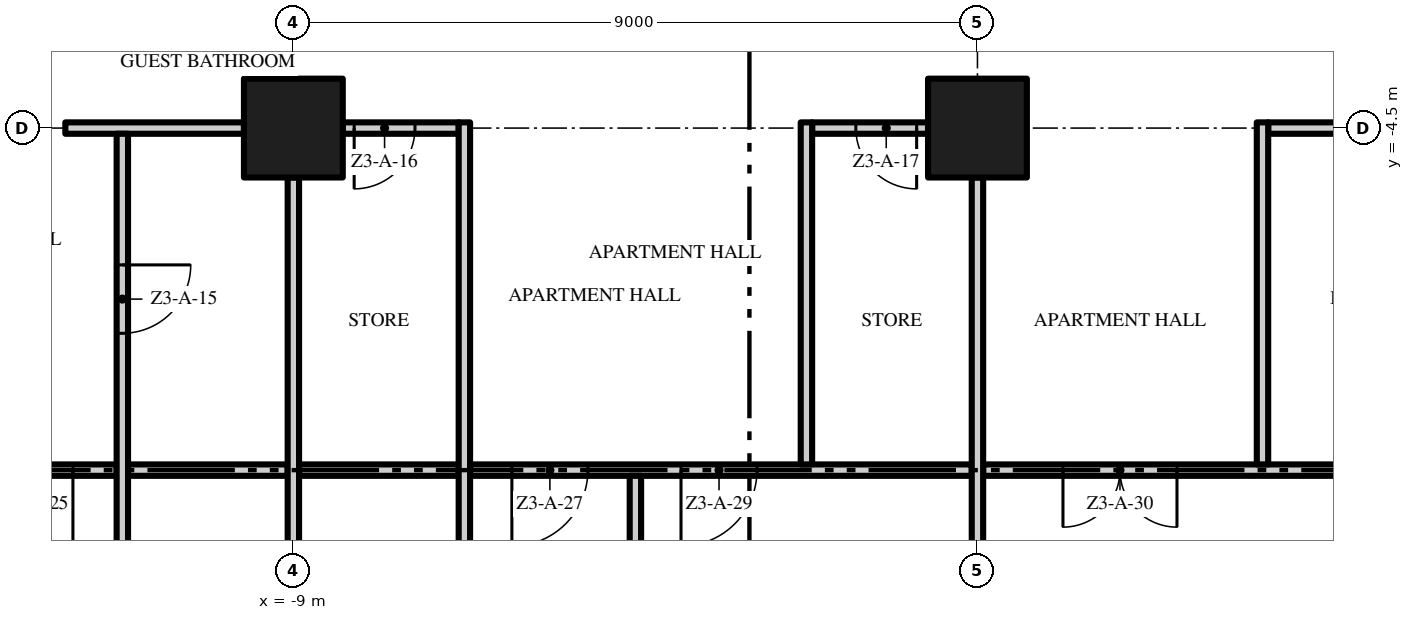
"""IFC4 building model, lengths in metres.
Left out: names, types, materials, properties, quantities, classifications, styles, units other than length and angle.
Written with IfcOpenShell. Run it as: python <this file> out.ifc"""

import sys

from ifc_helpers import new_model, si_unit, direction, frame, frame_2d, origin, origin_2d, place, context, subcontext, project, spatial, rectangle, extrude, element, fill, save


model = new_model("IFC4")
c1 = context("Model", 3, precision=1e-05, world=origin(), true_north=direction((0.0, 1.0)))
c2 = subcontext(c1, "Body", "Model", "MODEL_VIEW")
j1 = project(units=[si_unit("LENGTHUNIT", "METRE"), si_unit("PLANEANGLEUNIT", "RADIAN")], contexts=[c1])
p1 = place(None, origin())
s1 = spatial("IfcSite", under=j1, at=p1, CompositionType="ELEMENT")
p2 = place(p1, origin())
s2 = spatial("IfcBuilding", under=s1, at=p2, CompositionType="ELEMENT")
p3 = place(p2, frame((0.0, 0.0, 125.0)))
s3 = spatial("IfcBuildingStorey", under=s2, at=p3, CompositionType="ELEMENT", Elevation=125.0)
for number, where, z_axis, x_axis in (
    (1, (-9.0, -4.5, 0.0), (0.0, 0.0, 1.0), (1.0, 0.0, 0.0)),
    (2, (0.0, -4.5, 0.0), (0.0, 0.0, 1.0), (1.0, 0.0, 0.0)),
):
    element("IfcColumn", number, at=place(p3, frame(where, z_axis=z_axis, x_axis=x_axis)), inside=s3, PredefinedType="COLUMN", context=c2, shape_type="SweptSolid", body=[
        extrude(rectangle(XDim=1.3, YDim=1.3, at=origin_2d()), origin(), (0.0, 0.0, 1.0), 3.5),
    ])
p4 = place(p3, frame((-11.325, -9.0, 0.0), z_axis=(0.0, 0.0, 1.0), x_axis=(-1.0, 0.0, 0.0)))
e3 = element("IfcWall", 3, at=p4, inside=s3, PredefinedType="PARTITIONING", context=c2, shape_type="SweptSolid", body=[
    extrude(rectangle(XDim=10.875, YDim=0.15, at=frame_2d((5.438, 0.0))), origin(), (0.0, 0.0, 1.0), 3.5),
])
p5 = place(p4, frame((3.175, 0.0, 0.0)))
e4 = element("IfcOpeningElement", 4, at=p5, cuts=e3, PredefinedType="OPENING", context=c2, shape_type="SweptSolid", body=[
    extrude(rectangle(XDim=1.8, YDim=2.4, at=frame_2d((0.9, 1.2))), frame((0.0, 0.085, 0.0), z_axis=(0.0, -1.0, 0.0), x_axis=(1.0, 0.0, 0.0)), (0.0, 0.0, 1.0), 0.17),
])
p6 = place(p4, frame((0.575, 0.0, 0.0)))
e5 = element("IfcOpeningElement", 5, at=p6, cuts=e3, PredefinedType="OPENING", context=c2, shape_type="SweptSolid", body=[
    extrude(rectangle(XDim=1.0, YDim=2.4, at=frame_2d((0.5, 1.2))), frame((0.0, 0.085, 0.0), z_axis=(0.0, -1.0, 0.0), x_axis=(1.0, 0.0, 0.0)), (0.0, 0.0, 1.0), 0.17),
])
for number, where, z_axis, x_axis in (
    (6, (-11.175, -9.0, 0.0), (0.0, 0.0, 1.0), (1.0, 0.0, 0.0)),
    (7, (-8.925, -9.0, 0.0), (0.0, 0.0, 1.0), (1.0, 0.0, 0.0)),
):
    element("IfcWall", number, at=place(p3, frame(where, z_axis=z_axis, x_axis=x_axis)), inside=s3, PredefinedType="PARTITIONING", context=c2, shape_type="SweptSolid", body=[
        extrude(rectangle(XDim=2.1, YDim=0.15, at=frame_2d((1.05, 0.0))), origin(), (0.0, 0.0, 1.0), 3.5),
    ])
p7 = place(p3, frame((-0.075, -9.0, 0.0), z_axis=(0.0, 0.0, 1.0), x_axis=(-1.0, 0.0, 0.0)))
e8 = element("IfcWall", 8, at=p7, inside=s3, PredefinedType="PARTITIONING", context=c2, shape_type="SweptSolid", body=[
    extrude(rectangle(XDim=6.6, YDim=0.15, at=frame_2d((3.3, 0.0))), origin(), (0.0, 0.0, 1.0), 3.5),
])
p8 = place(p7, frame((5.05, 0.0, 0.0)))
e9 = element("IfcOpeningElement", 9, at=p8, cuts=e8, PredefinedType="OPENING", context=c2, shape_type="SweptSolid", body=[
    extrude(rectangle(XDim=1.0, YDim=2.4, at=frame_2d((0.5, 1.2))), frame((0.0, 0.085, 0.0), z_axis=(0.0, -1.0, 0.0), x_axis=(1.0, 0.0, 0.0)), (0.0, 0.0, 1.0), 0.17),
])
p9 = place(p7, frame((2.825, 0.0, 0.0)))
e10 = element("IfcOpeningElement", 10, at=p9, cuts=e8, PredefinedType="OPENING", context=c2, shape_type="SweptSolid", body=[
    extrude(rectangle(XDim=1.0, YDim=2.4, at=frame_2d((0.5, 1.2))), frame((0.0, 0.085, 0.0), z_axis=(0.0, -1.0, 0.0), x_axis=(1.0, 0.0, 0.0)), (0.0, 0.0, 1.0), 0.17),
])
p10 = place(p3, frame((8.925, -9.0, 0.0), z_axis=(0.0, 0.0, 1.0), x_axis=(-1.0, 0.0, 0.0)))
e11 = element("IfcWall", 11, at=p10, inside=s3, PredefinedType="PARTITIONING", context=c2, shape_type="SweptSolid", body=[
    extrude(rectangle(XDim=8.85, YDim=0.15, at=frame_2d((4.425, 0.0))), origin(), (0.0, 0.0, 1.0), 3.5),
])
p11 = place(p10, frame((6.3, 0.0, 0.0)))
e12 = element("IfcOpeningElement", 12, at=p11, cuts=e11, PredefinedType="OPENING", context=c2, shape_type="SweptSolid", body=[
    extrude(rectangle(XDim=1.5, YDim=2.4, at=frame_2d((0.75, 1.2))), frame((0.0, 0.085, 0.0), z_axis=(0.0, -1.0, 0.0), x_axis=(1.0, 0.0, 0.0)), (0.0, 0.0, 1.0), 0.17),
])
p12 = place(p3, frame((-12.0, -4.5, 0.0), z_axis=(0.0, 0.0, 1.0), x_axis=(1.0, 0.0, 0.0)))
e13 = element("IfcWall", 13, at=p12, inside=s3, PredefinedType="PARTITIONING", context=c2, shape_type="SweptSolid", body=[
    extrude(rectangle(XDim=2.35, YDim=0.15, at=frame_2d((1.175, 0.0))), origin(), (0.0, 0.0, 1.0), 3.5),
])
p13 = place(p3, frame((-6.825, -4.5, 0.0), z_axis=(0.0, 0.0, 1.0), x_axis=(-1.0, 0.0, 0.0)))
e14 = element("IfcWall", 14, at=p13, inside=s3, PredefinedType="PARTITIONING", context=c2, shape_type="SweptSolid", body=[
    extrude(rectangle(XDim=1.525, YDim=0.15, at=frame_2d((0.762, 0.0))), origin(), (0.0, 0.0, 1.0), 3.5),
])
p14 = place(p13, frame((0.575, 0.0, 0.0)))
e15 = element("IfcOpeningElement", 15, at=p14, cuts=e14, PredefinedType="OPENING", context=c2, shape_type="SweptSolid", body=[
    extrude(rectangle(XDim=0.8, YDim=2.0, at=frame_2d((0.4, 1.0))), frame((0.0, 0.085, 0.0), z_axis=(0.0, -1.0, 0.0), x_axis=(1.0, 0.0, 0.0)), (0.0, 0.0, 1.0), 0.17),
])
p15 = place(p3, frame((-0.65, -4.5, 0.0), z_axis=(0.0, 0.0, 1.0), x_axis=(-1.0, 0.0, 0.0)))
e16 = element("IfcWall", 16, at=p15, inside=s3, PredefinedType="PARTITIONING", context=c2, shape_type="SweptSolid", body=[
    extrude(rectangle(XDim=1.525, YDim=0.15, at=frame_2d((0.762, 0.0))), origin(), (0.0, 0.0, 1.0), 3.5),
])
p16 = place(p15, frame((0.15, 0.0, 0.0)))
e17 = element("IfcOpeningElement", 17, at=p16, cuts=e16, PredefinedType="OPENING", context=c2, shape_type="SweptSolid", body=[
    extrude(rectangle(XDim=0.8, YDim=2.0, at=frame_2d((0.4, 1.0))), frame((0.0, 0.085, 0.0), z_axis=(0.0, -1.0, 0.0), x_axis=(1.0, 0.0, 0.0)), (0.0, 0.0, 1.0), 0.17),
])
p17 = place(p3, frame((8.35, -4.5, 0.0), z_axis=(0.0, 0.0, 1.0), x_axis=(-1.0, 0.0, 0.0)))
e18 = element("IfcWall", 18, at=p17, inside=s3, PredefinedType="PARTITIONING", context=c2, shape_type="SweptSolid", body=[
    extrude(rectangle(XDim=4.525, YDim=0.15, at=frame_2d((2.263, 0.0))), origin(), (0.0, 0.0, 1.0), 3.5),
])
p18 = place(p17, frame((2.675, 0.0, 0.0)))
e19 = element("IfcOpeningElement", 19, at=p18, cuts=e18, PredefinedType="OPENING", context=c2, shape_type="SweptSolid", body=[
    extrude(rectangle(XDim=0.9, YDim=2.1, at=frame_2d((0.45, 1.05))), frame((0.0, 0.085, 0.0), z_axis=(0.0, -1.0, 0.0), x_axis=(1.0, 0.0, 0.0)), (0.0, 0.0, 1.0), 0.17),
])
p19 = place(p17, frame((0.15, 0.0, 0.0)))
e20 = element("IfcOpeningElement", 20, at=p19, cuts=e18, PredefinedType="OPENING", context=c2, shape_type="SweptSolid", body=[
    extrude(rectangle(XDim=0.8, YDim=2.0, at=frame_2d((0.4, 1.0))), frame((0.0, 0.085, 0.0), z_axis=(0.0, -1.0, 0.0), x_axis=(1.0, 0.0, 0.0)), (0.0, 0.0, 1.0), 0.17),
])
p20 = place(p3, frame((-11.25, -4.575, 0.0), z_axis=(0.0, 0.0, 1.0), x_axis=(0.0, -1.0, 0.0)))
e21 = element("IfcWall", 21, at=p20, inside=s3, PredefinedType="PARTITIONING", context=c2, shape_type="SweptSolid", body=[
    extrude(rectangle(XDim=7.5, YDim=0.15, at=frame_2d((3.75, 0.0))), origin(), (0.0, 0.0, 1.0), 3.5),
])
p21 = place(p20, frame((1.725, 0.0, 0.0)))
e22 = element("IfcOpeningElement", 22, at=p21, cuts=e21, PredefinedType="OPENING", context=c2, shape_type="SweptSolid", body=[
    extrude(rectangle(XDim=0.9, YDim=2.1, at=frame_2d((0.45, 1.05))), frame((0.0, 0.085, 0.0), z_axis=(0.0, -1.0, 0.0), x_axis=(1.0, 0.0, 0.0)), (0.0, 0.0, 1.0), 0.17),
])
p22 = place(p3, frame((-9.0, -12.85, 0.0), z_axis=(0.0, 0.0, 1.0), x_axis=(0.0, 1.0, 0.0)))
e23 = element("IfcWall", 23, at=p22, inside=s3, PredefinedType="PARTITIONING", context=c2, shape_type="SweptSolid", body=[
    extrude(rectangle(XDim=7.7, YDim=0.15, at=frame_2d((3.85, 0.0))), origin(), (0.0, 0.0, 1.0), 3.5),
])
p23 = place(p3, frame((-6.75, -12.075, 0.0), z_axis=(0.0, 0.0, 1.0), x_axis=(0.0, 1.0, 0.0)))
e24 = element("IfcWall", 24, at=p23, inside=s3, PredefinedType="PARTITIONING", context=c2, shape_type="SweptSolid", body=[
    extrude(rectangle(XDim=7.65, YDim=0.15, at=frame_2d((3.825, 0.0))), origin(), (0.0, 0.0, 1.0), 3.5),
])
p24 = place(p3, frame((-4.5, -17.7, 0.0), z_axis=(0.0, 0.0, 1.0), x_axis=(0.0, 1.0, 0.0)))
e25 = element("IfcWall", 25, at=p24, inside=s3, PredefinedType="PARTITIONING", context=c2, shape_type="SweptSolid", body=[
    extrude(rectangle(XDim=8.625, YDim=0.15, at=frame_2d((4.312, 0.0))), origin(), (0.0, 0.0, 1.0), 3.5),
])
p25 = place(p3, frame((-2.25, -8.925, 0.0), z_axis=(0.0, 0.0, 1.0), x_axis=(0.0, 1.0, 0.0)))
e26 = element("IfcWall", 26, at=p25, inside=s3, PredefinedType="PARTITIONING", context=c2, shape_type="SweptSolid", body=[
    extrude(rectangle(XDim=4.5, YDim=0.15, at=frame_2d((2.25, 0.0))), origin(), (0.0, 0.0, 1.0), 3.5),
])
p26 = place(p3, frame((0.0, -12.85, 0.0), z_axis=(0.0, 0.0, 1.0), x_axis=(0.0, 1.0, 0.0)))
e27 = element("IfcWall", 27, at=p26, inside=s3, PredefinedType="PARTITIONING", context=c2, shape_type="SweptSolid", body=[
    extrude(rectangle(XDim=7.7, YDim=0.15, at=frame_2d((3.85, 0.0))), origin(), (0.0, 0.0, 1.0), 3.5),
])
p27 = place(p3, frame((3.75, -8.925, 0.0), z_axis=(0.0, 0.0, 1.0), x_axis=(0.0, 1.0, 0.0)))
e28 = element("IfcWall", 28, at=p27, inside=s3, PredefinedType="PARTITIONING", context=c2, shape_type="SweptSolid", body=[
    extrude(rectangle(XDim=4.5, YDim=0.15, at=frame_2d((2.25, 0.0))), origin(), (0.0, 0.0, 1.0), 3.5),
])
p28 = place(p21, origin())
e29 = element("IfcDoor", 29, at=p28, inside=s3, OperationType="SINGLE_SWING_LEFT", PredefinedType="DOOR", context=c2, shape_type="SweptSolid", body=[
    extrude(rectangle(XDim=0.9, YDim=2.1, at=frame_2d((0.45, 1.05))), frame((0.0, 0.025, 0.0), z_axis=(0.0, -1.0, 0.0), x_axis=(1.0, 0.0, 0.0)), (0.0, 0.0, 1.0), 0.05),
])
fill(e22, e29)
p29 = place(p14, origin())
e30 = element("IfcDoor", 30, at=p29, inside=s3, OperationType="SINGLE_SWING_RIGHT", PredefinedType="DOOR", context=c2, shape_type="SweptSolid", body=[
    extrude(rectangle(XDim=0.8, YDim=2.0, at=frame_2d((0.4, 1.0))), frame((0.0, 0.025, 0.0), z_axis=(0.0, -1.0, 0.0), x_axis=(1.0, 0.0, 0.0)), (0.0, 0.0, 1.0), 0.05),
])
fill(e15, e30)
p30 = place(p16, origin())
e31 = element("IfcDoor", 31, at=p30, inside=s3, OperationType="SINGLE_SWING_LEFT", PredefinedType="DOOR", context=c2, shape_type="SweptSolid", body=[
    extrude(rectangle(XDim=0.8, YDim=2.0, at=frame_2d((0.4, 1.0))), frame((0.0, 0.025, 0.0), z_axis=(0.0, -1.0, 0.0), x_axis=(1.0, 0.0, 0.0)), (0.0, 0.0, 1.0), 0.05),
])
fill(e17, e31)
p31 = place(p6, origin())
e32 = element("IfcDoor", 32, at=p31, inside=s3, OperationType="SINGLE_SWING_LEFT", PredefinedType="DOOR", context=c2, shape_type="SweptSolid", body=[
    extrude(rectangle(XDim=1.0, YDim=2.4, at=frame_2d((0.5, 1.2))), frame((0.0, 0.025, 0.0), z_axis=(0.0, -1.0, 0.0), x_axis=(1.0, 0.0, 0.0)), (0.0, 0.0, 1.0), 0.05),
])
fill(e5, e32)
p32 = place(p8, origin())
e33 = element("IfcDoor", 33, at=p32, inside=s3, OperationType="SINGLE_SWING_RIGHT", PredefinedType="DOOR", context=c2, shape_type="SweptSolid", body=[
    extrude(rectangle(XDim=1.0, YDim=2.4, at=frame_2d((0.5, 1.2))), frame((0.0, 0.025, 0.0), z_axis=(0.0, -1.0, 0.0), x_axis=(1.0, 0.0, 0.0)), (0.0, 0.0, 1.0), 0.05),
])
fill(e9, e33)
p33 = place(p9, origin())
e34 = element("IfcDoor", 34, at=p33, inside=s3, OperationType="SINGLE_SWING_RIGHT", PredefinedType="DOOR", context=c2, shape_type="SweptSolid", body=[
    extrude(rectangle(XDim=1.0, YDim=2.4, at=frame_2d((0.5, 1.2))), frame((0.0, 0.025, 0.0), z_axis=(0.0, -1.0, 0.0), x_axis=(1.0, 0.0, 0.0)), (0.0, 0.0, 1.0), 0.05),
])
fill(e10, e34)
p34 = place(p11, origin())
e35 = element("IfcDoor", 35, at=p34, inside=s3, OperationType="DOUBLE_DOOR_SINGLE_SWING", PredefinedType="DOOR", context=c2, shape_type="SweptSolid", body=[
    extrude(rectangle(XDim=1.5, YDim=2.4, at=frame_2d((0.75, 1.2))), frame((0.0, 0.025, 0.0), z_axis=(0.0, -1.0, 0.0), x_axis=(1.0, 0.0, 0.0)), (0.0, 0.0, 1.0), 0.05),
])
fill(e12, e35)
save(model, sys.argv[1])
